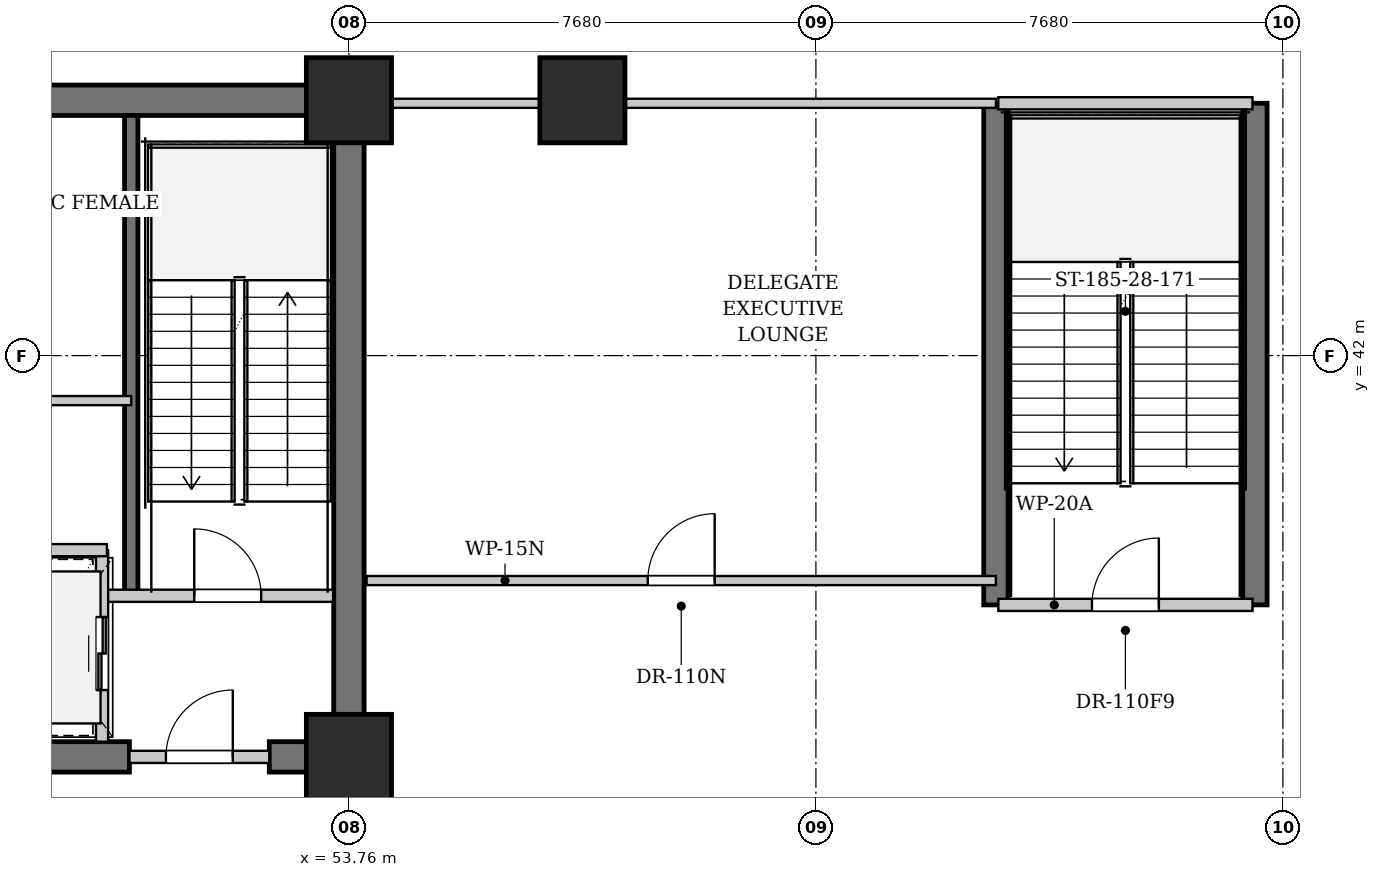
"""IFC4 building model, lengths in metres.
Left out: names, types, materials, properties, quantities, classifications, styles, units other than length and angle.
Written with IfcOpenShell. Run it as: python <this file> out.ifc"""

import sys

from ifc_helpers import new_model, si_unit, direction, frame, frame_2d, origin, origin_2d, place, context, subcontext, project, spatial, rectangle, extrude, element, fill, save


model = new_model("IFC4")
c1 = context("Model", 3, precision=1e-05, world=origin(), true_north=direction((0.0, 1.0)))
c2 = subcontext(c1, "Body", "Model", "MODEL_VIEW")
j1 = project(units=[si_unit("LENGTHUNIT", "METRE"), si_unit("PLANEANGLEUNIT", "RADIAN")], contexts=[c1])
p1 = place(None, origin())
s1 = spatial("IfcSite", under=j1, at=p1, CompositionType="ELEMENT")
p2 = place(p1, origin())
s2 = spatial("IfcBuilding", under=s1, at=p2, CompositionType="ELEMENT")
p3 = place(p2, frame((0.0, 0.0, 20.4)))
s3 = spatial("IfcBuildingStorey", under=s2, at=p3, CompositionType="ELEMENT", Elevation=20.4)
p4 = place(p3, frame((22.79, 46.2, 0.0), z_axis=(0.0, 0.0, 1.0), x_axis=(1.0, 0.0, 0.0)))
e1 = element("IfcWall", 1, at=p4, inside=s3, PredefinedType="SHEAR", context=c2, shape_type="SweptSolid", body=[
    extrude(rectangle(XDim=31.22, YDim=0.5, at=frame_2d((15.61, 0.0))), origin(), (0.0, 0.0, 1.0), 4.38),
])
p5 = place(p3, frame((42.1, 35.4, 0.0), z_axis=(0.0, 0.0, 1.0), x_axis=(1.0, 0.0, 0.0)))
e2 = element("IfcWall", 2, at=p5, inside=s3, PredefinedType="SHEAR", context=c2, shape_type="SweptSolid", body=[
    extrude(rectangle(XDim=8.05, YDim=0.5, at=frame_2d((4.025, 0.0))), origin(), (0.0, 0.0, 1.0), 4.38),
])
p6 = place(p5, frame((4.85, 0.0, 0.0)))
e3 = element("IfcOpeningElement", 3, at=p6, cuts=e2, PredefinedType="OPENING", context=c2, shape_type="SweptSolid", body=[
    extrude(rectangle(XDim=0.9, YDim=2.15, at=frame_2d((0.45, 1.075))), frame((0.0, 0.26, 0.0), z_axis=(0.0, -1.0, 0.0), x_axis=(1.0, 0.0, 0.0)), (0.0, 0.0, 1.0), 0.52),
])
p7 = place(p3, frame((52.45, 35.4, 0.0), z_axis=(0.0, 0.0, 1.0), x_axis=(1.0, 0.0, 0.0)))
e4 = element("IfcWall", 4, at=p7, inside=s3, PredefinedType="SHEAR", context=c2, shape_type="SweptSolid", body=[
    extrude(rectangle(XDim=1.56, YDim=0.5, at=frame_2d((0.78, 0.0))), origin(), (0.0, 0.0, 1.0), 4.38),
])
p8 = place(p3, frame((53.76, 35.65, 0.0), z_axis=(0.0, 0.0, 1.0), x_axis=(0.0, 1.0, 0.0)))
e5 = element("IfcWall", 5, at=p8, inside=s3, PredefinedType="SHEAR", context=c2, shape_type="SweptSolid", body=[
    extrude(rectangle(XDim=10.3, YDim=0.5, at=frame_2d((5.15, 0.0))), origin(), (0.0, 0.0, 1.0), 4.38),
])
p9 = place(p3, frame((50.18, 38.05, 0.0), z_axis=(0.0, 0.0, 1.0), x_axis=(0.0, 1.0, 0.0)))
e6 = element("IfcWall", 6, at=p9, inside=s3, PredefinedType="SHEAR", context=c2, shape_type="SweptSolid", body=[
    extrude(rectangle(XDim=7.9, YDim=0.22, at=frame_2d((3.95, 0.0))), origin(), (0.0, 0.0, 1.0), 4.38),
])
for number, where, z_axis, x_axis in (
    (7, (64.4, 37.9, 0.0), (0.0, 0.0, 1.0), (0.0, 1.0, 0.0)),
    (8, (68.66, 37.9, 0.0), (0.0, 0.0, 1.0), (0.0, 1.0, 0.0)),
):
    element("IfcWall", number, at=place(p3, frame(where, z_axis=z_axis, x_axis=x_axis)), inside=s3, PredefinedType="SHEAR", context=c2, shape_type="SweptSolid", body=[
        extrude(rectangle(XDim=8.25, YDim=0.4, at=frame_2d((4.125, 0.0))), origin(), (0.0, 0.0, 1.0), 4.38),
    ])
for number, where, z_axis, x_axis in (
    (9, (53.76, 35.4, 0.0), (0.0, 0.0, 1.0), (1.0, 0.0, 0.0)),
    (10, (53.76, 46.2, 0.0), (0.0, 0.0, 1.0), (1.0, 0.0, 0.0)),
    (11, (57.6, 46.2, 0.0), (0.0, 0.0, 1.0), (1.0, 0.0, 0.0)),
):
    element("IfcColumn", number, at=place(p3, frame(where, z_axis=z_axis, x_axis=x_axis)), inside=s3, PredefinedType="COLUMN", context=c2, shape_type="SweptSolid", body=[
        extrude(rectangle(XDim=1.4, YDim=1.4, at=origin_2d()), origin(), (0.0, 0.0, 1.0), 4.8),
    ])
p10 = place(p3, frame((49.78, 38.05, 0.0), z_axis=(0.0, 0.0, 1.0), x_axis=(1.0, 0.0, 0.0)))
e12 = element("IfcWall", 12, at=p10, inside=s3, PredefinedType="PARTITIONING", context=c2, shape_type="SweptSolid", body=[
    extrude(rectangle(XDim=3.72, YDim=0.2, at=frame_2d((1.86, 0.0))), origin(), (0.0, 0.0, 1.0), 4.38),
])
p11 = place(p10, frame((1.436, 0.0, 0.0)))
e13 = element("IfcOpeningElement", 13, at=p11, cuts=e12, PredefinedType="OPENING", context=c2, shape_type="SweptSolid", body=[
    extrude(rectangle(XDim=1.1, YDim=2.15, at=frame_2d((0.55, 1.075))), frame((0.0, 0.11, 0.0), z_axis=(0.0, -1.0, 0.0), x_axis=(1.0, 0.0, 0.0)), (0.0, 0.0, 1.0), 0.22),
])
p12 = place(p3, frame((50.15, 35.4, 0.0), z_axis=(0.0, 0.0, 1.0), x_axis=(1.0, 0.0, 0.0)))
e14 = element("IfcWall", 14, at=p12, inside=s3, PredefinedType="PARTITIONING", context=c2, shape_type="SweptSolid", body=[
    extrude(rectangle(XDim=2.3, YDim=0.2, at=frame_2d((1.15, 0.0))), origin(), (0.0, 0.0, 1.0), 3.575),
])
p13 = place(p12, frame((0.6, 0.0, 0.0)))
e15 = element("IfcOpeningElement", 15, at=p13, cuts=e14, PredefinedType="OPENING", context=c2, shape_type="SweptSolid", body=[
    extrude(rectangle(XDim=1.1, YDim=2.15, at=frame_2d((0.55, 1.075))), frame((0.0, 0.11, 0.0), z_axis=(0.0, -1.0, 0.0), x_axis=(1.0, 0.0, 0.0)), (0.0, 0.0, 1.0), 0.22),
])
p14 = place(p3, frame((49.7, 35.65, 0.0), z_axis=(0.0, 0.0, 1.0), x_axis=(0.0, 1.0, 0.0)))
e16 = element("IfcWall", 16, at=p14, inside=s3, PredefinedType="PARTITIONING", context=c2, shape_type="SweptSolid", body=[
    extrude(rectangle(XDim=3.15, YDim=0.2, at=frame_2d((1.575, 0.0))), origin(), (0.0, 0.0, 1.0), 4.38),
])
p15 = place(p14, frame((0.85, 0.0, 0.0)))
e17 = element("IfcOpeningElement", 17, at=p15, cuts=e16, PredefinedType="OPENING", context=c2, shape_type="SweptSolid", body=[
    extrude(rectangle(XDim=1.2, YDim=2.2, at=frame_2d((0.6, 1.1))), frame((0.0, 0.11, 0.0), z_axis=(0.0, -1.0, 0.0), x_axis=(1.0, 0.0, 0.0)), (0.0, 0.0, 1.0), 0.22),
])
p16 = place(p3, frame((47.92, 38.8, 0.0), z_axis=(0.0, 0.0, 1.0), x_axis=(1.0, 0.0, 0.0)))
e18 = element("IfcWall", 18, at=p16, inside=s3, PredefinedType="PARTITIONING", context=c2, shape_type="SweptSolid", body=[
    extrude(rectangle(XDim=1.86, YDim=0.2, at=frame_2d((0.93, 0.0))), origin(), (0.0, 0.0, 1.0), 4.38),
])
p17 = place(p3, frame((47.88, 41.26, 0.0), z_axis=(0.0, 0.0, 1.0), x_axis=(1.0, 0.0, 0.0)))
e19 = element("IfcWall", 19, at=p17, inside=s3, PredefinedType="PARTITIONING", context=c2, shape_type="SweptSolid", body=[
    extrude(rectangle(XDim=2.3, YDim=0.15, at=frame_2d((1.15, 0.0))), origin(), (0.0, 0.0, 1.0), 4.38),
])
p18 = place(p3, frame((64.44, 37.9, 0.0), z_axis=(0.0, 0.0, 1.0), x_axis=(1.0, 0.0, 0.0)))
e20 = element("IfcWall", 20, at=p18, inside=s3, PredefinedType="PARTITIONING", context=c2, shape_type="SweptSolid", body=[
    extrude(rectangle(XDim=4.18, YDim=0.2, at=frame_2d((2.09, 0.0))), origin(), (0.0, 0.0, 1.0), 4.38),
])
p19 = place(p18, frame((1.54, 0.0, 0.0)))
e21 = element("IfcOpeningElement", 21, at=p19, cuts=e20, PredefinedType="OPENING", context=c2, shape_type="SweptSolid", body=[
    extrude(rectangle(XDim=1.1, YDim=2.15, at=frame_2d((0.55, 1.075))), frame((0.0, 0.11, 0.0), z_axis=(0.0, -1.0, 0.0), x_axis=(1.0, 0.0, 0.0)), (0.0, 0.0, 1.0), 0.22),
])
p20 = place(p3, frame((64.44, 46.15, 0.0), z_axis=(0.0, 0.0, 1.0), x_axis=(1.0, 0.0, 0.0)))
e22 = element("IfcWall", 22, at=p20, inside=s3, PredefinedType="PARTITIONING", context=c2, shape_type="SweptSolid", body=[
    extrude(rectangle(XDim=4.18, YDim=0.2, at=frame_2d((2.09, 0.0))), origin(), (0.0, 0.0, 1.0), 4.38),
])
p21 = place(p3, frame((54.05, 38.3, 0.0), z_axis=(0.0, 0.0, 1.0), x_axis=(1.0, 0.0, 0.0)))
e23 = element("IfcWall", 23, at=p21, inside=s3, PredefinedType="PARTITIONING", context=c2, shape_type="SweptSolid", body=[
    extrude(rectangle(XDim=10.35, YDim=0.15, at=frame_2d((5.175, 0.0))), origin(), (0.0, 0.0, 1.0), 4.38),
])
p22 = place(p21, frame((4.625, 0.0, 0.0)))
e24 = element("IfcOpeningElement", 24, at=p22, cuts=e23, PredefinedType="OPENING", context=c2, shape_type="SweptSolid", body=[
    extrude(rectangle(XDim=1.1, YDim=2.15, at=frame_2d((0.55, 1.075))), frame((0.0, 0.085, 0.0), z_axis=(0.0, -1.0, 0.0), x_axis=(1.0, 0.0, 0.0)), (0.0, 0.0, 1.0), 0.17),
])
p23 = place(p3, frame((54.05, 46.15, 0.0), z_axis=(0.0, 0.0, 1.0), x_axis=(1.0, 0.0, 0.0)))
e25 = element("IfcWall", 25, at=p23, inside=s3, PredefinedType="PARTITIONING", context=c2, shape_type="SweptSolid", body=[
    extrude(rectangle(XDim=10.35, YDim=0.15, at=frame_2d((5.175, 0.0))), origin(), (0.0, 0.0, 1.0), 4.38),
])
p24 = place(p11, origin())
e26 = element("IfcDoor", 26, at=p24, inside=s3, OperationType="SINGLE_SWING_LEFT", PredefinedType="DOOR", context=c2, shape_type="SweptSolid", body=[
    extrude(rectangle(XDim=1.1, YDim=2.15, at=frame_2d((0.55, 1.075))), frame((0.0, 0.025, 0.0), z_axis=(0.0, -1.0, 0.0), x_axis=(1.0, 0.0, 0.0)), (0.0, 0.0, 1.0), 0.05),
])
fill(e13, e26)
p25 = place(p13, origin())
e27 = element("IfcDoor", 27, at=p25, inside=s3, OperationType="SINGLE_SWING_RIGHT", PredefinedType="DOOR", context=c2, shape_type="SweptSolid", body=[
    extrude(rectangle(XDim=1.1, YDim=2.15, at=frame_2d((0.55, 1.075))), frame((0.0, 0.025, 0.0), z_axis=(0.0, -1.0, 0.0), x_axis=(1.0, 0.0, 0.0)), (0.0, 0.0, 1.0), 0.05),
])
fill(e15, e27)
p26 = place(p15, origin())
e28 = element("IfcDoor", 28, at=p26, inside=s3, OperationType="DOUBLE_DOOR_SLIDING", PredefinedType="DOOR", context=c2, shape_type="SweptSolid", body=[
    extrude(rectangle(XDim=1.2, YDim=2.2, at=frame_2d((0.6, 1.1))), frame((0.0, 0.025, 0.0), z_axis=(0.0, -1.0, 0.0), x_axis=(1.0, 0.0, 0.0)), (0.0, 0.0, 1.0), 0.05),
])
fill(e17, e28)
p27 = place(p19, origin())
e29 = element("IfcDoor", 29, at=p27, inside=s3, OperationType="SINGLE_SWING_RIGHT", PredefinedType="DOOR", context=c2, shape_type="SweptSolid", body=[
    extrude(rectangle(XDim=1.1, YDim=2.15, at=frame_2d((0.55, 1.075))), frame((0.0, 0.025, 0.0), z_axis=(0.0, -1.0, 0.0), x_axis=(1.0, 0.0, 0.0)), (0.0, 0.0, 1.0), 0.05),
])
fill(e21, e29)
p28 = place(p22, origin())
e30 = element("IfcDoor", 30, at=p28, inside=s3, OperationType="SINGLE_SWING_RIGHT", PredefinedType="DOOR", context=c2, shape_type="SweptSolid", body=[
    extrude(rectangle(XDim=1.1, YDim=2.15, at=frame_2d((0.55, 1.075))), frame((0.0, 0.025, 0.0), z_axis=(0.0, -1.0, 0.0), x_axis=(1.0, 0.0, 0.0)), (0.0, 0.0, 1.0), 0.05),
])
fill(e24, e30)
save(model, sys.argv[1])
